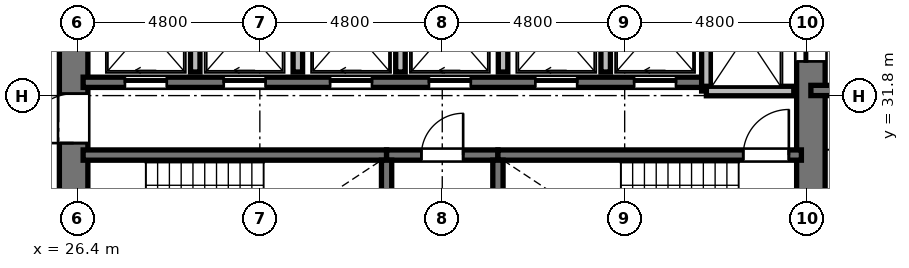
"""IFC4 building model, lengths in metres.
Left out: names, types, materials, properties, quantities, classifications, styles, units other than length and angle.
Written with IfcOpenShell. Run it as: python <this file> out.ifc"""

import sys

from ifc_helpers import new_model, si_unit, direction, frame, frame_2d, origin, place, context, subcontext, project, spatial, rectangle, extrude, element, fill, save


model = new_model("IFC4")
c1 = context("Model", 3, precision=1e-05, world=origin(), true_north=direction((0.0, 1.0)))
c2 = subcontext(c1, "Body", "Model", "MODEL_VIEW")
j1 = project(units=[si_unit("LENGTHUNIT", "METRE"), si_unit("PLANEANGLEUNIT", "RADIAN")], contexts=[c1])
p1 = place(None, origin())
s1 = spatial("IfcSite", under=j1, at=p1, CompositionType="ELEMENT")
p2 = place(p1, origin())
s2 = spatial("IfcBuilding", under=s1, at=p2, CompositionType="ELEMENT")
p3 = place(p2, frame((0.0, 0.0, 85.392)))
s3 = spatial("IfcBuildingStorey", under=s2, at=p3, CompositionType="ELEMENT", Elevation=85.392)
p4 = place(p3, frame((26.3, 20.95, 0.0), z_axis=(0.0, 0.0, 1.0), x_axis=(0.0, 1.0, 0.0)))
e1 = element("IfcWall", 1, at=p4, inside=s3, PredefinedType="SHEAR", context=c2, shape_type="SweptSolid", body=[
    extrude(rectangle(XDim=14.1, YDim=0.75, at=frame_2d((7.05, 0.0))), origin(), (0.0, 0.0, 1.0), 3.648),
])
p5 = place(p4, frame((6.5, 0.0, 0.0)))
e2 = element("IfcOpeningElement", 2, at=p5, cuts=e1, PredefinedType="OPENING", context=c2, shape_type="SweptSolid", body=[
    extrude(rectangle(XDim=1.2, YDim=2.15, at=frame_2d((0.6, 1.075))), frame((0.0, 0.385, 0.0), z_axis=(0.0, -1.0, 0.0), x_axis=(1.0, 0.0, 0.0)), (0.0, 0.0, 1.0), 0.77),
])
p6 = place(p4, frame((9.6, 0.0, 0.0)))
e3 = element("IfcOpeningElement", 3, at=p6, cuts=e1, PredefinedType="OPENING", context=c2, shape_type="SweptSolid", body=[
    extrude(rectangle(XDim=1.3, YDim=2.2, at=frame_2d((0.65, 1.1))), frame((0.0, 0.385, 0.0), z_axis=(0.0, -1.0, 0.0), x_axis=(1.0, 0.0, 0.0)), (0.0, 0.0, 1.0), 0.77),
])
p7 = place(p4, frame((3.26, 0.0, 0.0)))
e4 = element("IfcOpeningElement", 4, at=p7, cuts=e1, PredefinedType="OPENING", context=c2, shape_type="SweptSolid", body=[
    extrude(rectangle(XDim=1.3, YDim=2.2, at=frame_2d((0.65, 1.1))), frame((0.0, 0.385, 0.0), z_axis=(0.0, -1.0, 0.0), x_axis=(1.0, 0.0, 0.0)), (0.0, 0.0, 1.0), 0.77),
])
p8 = place(p3, frame((45.7, 20.95, 0.0), z_axis=(0.0, 0.0, 1.0), x_axis=(0.0, 1.0, 0.0)))
e5 = element("IfcWall", 5, at=p8, inside=s3, PredefinedType="SHEAR", context=c2, shape_type="SweptSolid", body=[
    extrude(rectangle(XDim=14.1, YDim=0.75, at=frame_2d((7.05, 0.0))), origin(), (0.0, 0.0, 1.0), 3.648),
])
p9 = place(p8, frame((11.75, 0.0, 0.0)))
e6 = element("IfcOpeningElement", 6, at=p9, cuts=e5, PredefinedType="OPENING", context=c2, shape_type="SweptSolid", body=[
    extrude(rectangle(XDim=1.4, YDim=2.3, at=frame_2d((0.7, 1.15))), frame((0.0, 0.385, 0.0), z_axis=(0.0, -1.0, 0.0), x_axis=(1.0, 0.0, 0.0)), (0.0, 0.0, 1.0), 0.77),
])
p10 = place(p8, frame((0.95, 0.0, 0.0)))
e7 = element("IfcOpeningElement", 7, at=p10, cuts=e5, PredefinedType="OPENING", context=c2, shape_type="SweptSolid", body=[
    extrude(rectangle(XDim=1.4, YDim=2.3, at=frame_2d((0.7, 1.15))), frame((0.0, 0.385, 0.0), z_axis=(0.0, -1.0, 0.0), x_axis=(1.0, 0.0, 0.0)), (0.0, 0.0, 1.0), 0.77),
])
p11 = place(p3, frame((26.55, 30.235, 0.0), z_axis=(0.0, 0.0, 1.0), x_axis=(1.0, 0.0, 0.0)))
e8 = element("IfcWall", 8, at=p11, inside=s3, PredefinedType="SHEAR", context=c2, shape_type="SweptSolid", body=[
    extrude(rectangle(XDim=7.985, YDim=0.27, at=frame_2d((3.992, 0.0))), origin(), (0.0, 0.0, 1.0), 3.648),
])
p12 = place(p3, frame((34.535, 30.235, 0.0), z_axis=(0.0, 0.0, 1.0), x_axis=(1.0, 0.0, 0.0)))
e9 = element("IfcWall", 9, at=p12, inside=s3, PredefinedType="SHEAR", context=c2, shape_type="SweptSolid", body=[
    extrude(rectangle(XDim=2.93, YDim=0.27, at=frame_2d((1.465, 0.0))), origin(), (0.0, 0.0, 1.0), 3.648),
])
p13 = place(p12, frame((0.915, 0.0, 0.0)))
e10 = element("IfcOpeningElement", 10, at=p13, cuts=e9, PredefinedType="OPENING", context=c2, shape_type="SweptSolid", body=[
    extrude(rectangle(XDim=1.1, YDim=2.15, at=frame_2d((0.55, 1.075))), frame((0.0, 0.145, 0.0), z_axis=(0.0, -1.0, 0.0), x_axis=(1.0, 0.0, 0.0)), (0.0, 0.0, 1.0), 0.29),
])
p14 = place(p3, frame((37.465, 30.235, 0.0), z_axis=(0.0, 0.0, 1.0), x_axis=(1.0, 0.0, 0.0)))
e11 = element("IfcWall", 11, at=p14, inside=s3, PredefinedType="SHEAR", context=c2, shape_type="SweptSolid", body=[
    extrude(rectangle(XDim=7.985, YDim=0.27, at=frame_2d((3.992, 0.0))), origin(), (0.0, 0.0, 1.0), 3.648),
])
p15 = place(p14, frame((6.455, 0.0, 0.0)))
e12 = element("IfcOpeningElement", 12, at=p15, cuts=e11, PredefinedType="OPENING", context=c2, shape_type="SweptSolid", body=[
    extrude(rectangle(XDim=1.2, YDim=2.15, at=frame_2d((0.6, 1.075))), frame((0.0, 0.145, 0.0), z_axis=(0.0, -1.0, 0.0), x_axis=(1.0, 0.0, 0.0)), (0.0, 0.0, 1.0), 0.29),
])
for number, where, z_axis, x_axis in (
    (13, (34.535, 26.02, 0.0), (0.0, 0.0, 1.0), (0.0, 1.0, 0.0)),
    (14, (37.465, 26.02, 0.0), (0.0, 0.0, 1.0), (0.0, 1.0, 0.0)),
):
    element("IfcWall", number, at=place(p3, frame(where, z_axis=z_axis, x_axis=x_axis)), inside=s3, PredefinedType="SHEAR", context=c2, shape_type="SweptSolid", body=[
        extrude(rectangle(XDim=4.08, YDim=0.27, at=frame_2d((2.04, 0.0))), origin(), (0.0, 0.0, 1.0), 3.648),
    ])
p16 = place(p3, frame((26.55, 32.15, 0.0), z_axis=(0.0, 0.0, 1.0), x_axis=(1.0, 0.0, 0.0)))
e15 = element("IfcWall", 15, at=p16, inside=s3, PredefinedType="SHEAR", context=c2, shape_type="SweptSolid", body=[
    extrude(rectangle(XDim=16.4, YDim=0.27, at=frame_2d((8.2, 0.0))), origin(), (0.0, 0.0, 1.0), 3.648),
])
p17 = place(p16, frame((1.1, 0.0, 0.0)))
e16 = element("IfcOpeningElement", 16, at=p17, cuts=e15, PredefinedType="OPENING", context=c2, shape_type="SweptSolid", body=[
    extrude(rectangle(XDim=1.1, YDim=2.2, at=frame_2d((0.55, 1.1))), frame((0.0, 0.145, 0.0), z_axis=(0.0, -1.0, 0.0), x_axis=(1.0, 0.0, 0.0)), (0.0, 0.0, 1.0), 0.29),
])
p18 = place(p16, frame((3.7, 0.0, 0.0)))
e17 = element("IfcOpeningElement", 17, at=p18, cuts=e15, PredefinedType="OPENING", context=c2, shape_type="SweptSolid", body=[
    extrude(rectangle(XDim=1.1, YDim=2.2, at=frame_2d((0.55, 1.1))), frame((0.0, 0.145, 0.0), z_axis=(0.0, -1.0, 0.0), x_axis=(1.0, 0.0, 0.0)), (0.0, 0.0, 1.0), 0.29),
])
p19 = place(p16, frame((6.5, 0.0, 0.0)))
e18 = element("IfcOpeningElement", 18, at=p19, cuts=e15, PredefinedType="OPENING", context=c2, shape_type="SweptSolid", body=[
    extrude(rectangle(XDim=1.1, YDim=2.2, at=frame_2d((0.55, 1.1))), frame((0.0, 0.145, 0.0), z_axis=(0.0, -1.0, 0.0), x_axis=(1.0, 0.0, 0.0)), (0.0, 0.0, 1.0), 0.29),
])
p20 = place(p16, frame((9.1, 0.0, 0.0)))
e19 = element("IfcOpeningElement", 19, at=p20, cuts=e15, PredefinedType="OPENING", context=c2, shape_type="SweptSolid", body=[
    extrude(rectangle(XDim=1.1, YDim=2.2, at=frame_2d((0.55, 1.1))), frame((0.0, 0.145, 0.0), z_axis=(0.0, -1.0, 0.0), x_axis=(1.0, 0.0, 0.0)), (0.0, 0.0, 1.0), 0.29),
])
p21 = place(p16, frame((11.9, 0.0, 0.0)))
e20 = element("IfcOpeningElement", 20, at=p21, cuts=e15, PredefinedType="OPENING", context=c2, shape_type="SweptSolid", body=[
    extrude(rectangle(XDim=1.1, YDim=2.2, at=frame_2d((0.55, 1.1))), frame((0.0, 0.145, 0.0), z_axis=(0.0, -1.0, 0.0), x_axis=(1.0, 0.0, 0.0)), (0.0, 0.0, 1.0), 0.29),
])
p22 = place(p16, frame((14.5, 0.0, 0.0)))
e21 = element("IfcOpeningElement", 21, at=p22, cuts=e15, PredefinedType="OPENING", context=c2, shape_type="SweptSolid", body=[
    extrude(rectangle(XDim=1.1, YDim=2.2, at=frame_2d((0.55, 1.1))), frame((0.0, 0.145, 0.0), z_axis=(0.0, -1.0, 0.0), x_axis=(1.0, 0.0, 0.0)), (0.0, 0.0, 1.0), 0.29),
])
p23 = place(p3, frame((42.95, 31.92, 0.0), z_axis=(0.0, 0.0, 1.0), x_axis=(0.0, 1.0, 0.0)))
e22 = element("IfcWall", 22, at=p23, inside=s3, PredefinedType="SOLIDWALL", context=c2, shape_type="SweptSolid", body=[
    extrude(rectangle(XDim=3.18, YDim=0.25, at=frame_2d((1.59, 0.0))), origin(), (0.0, 0.0, 1.0), 3.428),
])
p24 = place(p3, frame((42.95, 31.92, 0.0), z_axis=(0.0, 0.0, 1.0), x_axis=(1.0, 0.0, 0.0)))
e23 = element("IfcWall", 23, at=p24, inside=s3, PredefinedType="SOLIDWALL", context=c2, shape_type="SweptSolid", body=[
    extrude(rectangle(XDim=2.3, YDim=0.25, at=frame_2d((1.15, 0.0))), origin(), (0.0, 0.0, 1.0), 3.428),
])
for number, where, z_axis, x_axis in (
    (24, (29.5, 32.42, 0.0), (0.0, 0.0, 1.0), (0.0, 1.0, 0.0)),
    (25, (32.2, 32.42, 0.0), (0.0, 0.0, 1.0), (0.0, 1.0, 0.0)),
    (26, (34.9, 32.42, 0.0), (0.0, 0.0, 1.0), (0.0, 1.0, 0.0)),
    (27, (37.6, 32.42, 0.0), (0.0, 0.0, 1.0), (0.0, 1.0, 0.0)),
    (28, (40.3, 32.42, 0.0), (0.0, 0.0, 1.0), (0.0, 1.0, 0.0)),
):
    element("IfcWall", number, at=place(p3, frame(where, z_axis=z_axis, x_axis=x_axis)), inside=s3, PredefinedType="SOLIDWALL", context=c2, shape_type="SweptSolid", body=[
        extrude(rectangle(XDim=2.68, YDim=0.25, at=frame_2d((1.34, 0.0))), origin(), (0.0, 0.0, 1.0), 3.428),
    ])
p25 = place(p3, frame((45.7, 31.935, 0.0), z_axis=(0.0, 0.0, 1.0), x_axis=(1.0, 0.0, 0.0)))
e29 = element("IfcWall", 29, at=p25, inside=s3, PredefinedType="SHEAR", context=c2, shape_type="SweptSolid", body=[
    extrude(rectangle(XDim=4.715, YDim=0.27, at=frame_2d((2.357, 0.0))), origin(), (0.0, 0.0, 1.0), 3.648),
])
p26 = place(p15, origin())
e30 = element("IfcDoor", 30, at=p26, inside=s3, OperationType="SINGLE_SWING_RIGHT", PredefinedType="DOOR", context=c2, shape_type="SweptSolid", body=[
    extrude(rectangle(XDim=1.2, YDim=2.15, at=frame_2d((0.6, 1.075))), frame((0.0, 0.025, 0.0), z_axis=(0.0, -1.0, 0.0), x_axis=(1.0, 0.0, 0.0)), (0.0, 0.0, 1.0), 0.05),
])
fill(e12, e30)
p27 = place(p13, origin())
e31 = element("IfcDoor", 31, at=p27, inside=s3, OperationType="SINGLE_SWING_RIGHT", PredefinedType="DOOR", context=c2, shape_type="SweptSolid", body=[
    extrude(rectangle(XDim=1.1, YDim=2.15, at=frame_2d((0.55, 1.075))), frame((0.0, 0.025, 0.0), z_axis=(0.0, -1.0, 0.0), x_axis=(1.0, 0.0, 0.0)), (0.0, 0.0, 1.0), 0.05),
])
fill(e10, e31)
p28 = place(p6, origin())
e32 = element("IfcDoor", 32, at=p28, inside=s3, OperationType="SINGLE_SWING_LEFT", PredefinedType="DOOR", context=c2, shape_type="SweptSolid", body=[
    extrude(rectangle(XDim=1.3, YDim=2.2, at=frame_2d((0.65, 1.1))), frame((0.0, 0.025, 0.0), z_axis=(0.0, -1.0, 0.0), x_axis=(1.0, 0.0, 0.0)), (0.0, 0.0, 1.0), 0.05),
])
fill(e3, e32)
p29 = place(p17, origin())
e33 = element("IfcDoor", 33, at=p29, inside=s3, OperationType="SLIDING_TO_LEFT", PredefinedType="DOOR", context=c2, shape_type="SweptSolid", body=[
    extrude(rectangle(XDim=1.1, YDim=2.2, at=frame_2d((0.55, 1.1))), frame((0.0, 0.025, 0.0), z_axis=(0.0, -1.0, 0.0), x_axis=(1.0, 0.0, 0.0)), (0.0, 0.0, 1.0), 0.05),
])
fill(e16, e33)
p30 = place(p18, origin())
e34 = element("IfcDoor", 34, at=p30, inside=s3, OperationType="SLIDING_TO_LEFT", PredefinedType="DOOR", context=c2, shape_type="SweptSolid", body=[
    extrude(rectangle(XDim=1.1, YDim=2.2, at=frame_2d((0.55, 1.1))), frame((0.0, 0.025, 0.0), z_axis=(0.0, -1.0, 0.0), x_axis=(1.0, 0.0, 0.0)), (0.0, 0.0, 1.0), 0.05),
])
fill(e17, e34)
p31 = place(p19, origin())
e35 = element("IfcDoor", 35, at=p31, inside=s3, OperationType="SLIDING_TO_LEFT", PredefinedType="DOOR", context=c2, shape_type="SweptSolid", body=[
    extrude(rectangle(XDim=1.1, YDim=2.2, at=frame_2d((0.55, 1.1))), frame((0.0, 0.025, 0.0), z_axis=(0.0, -1.0, 0.0), x_axis=(1.0, 0.0, 0.0)), (0.0, 0.0, 1.0), 0.05),
])
fill(e18, e35)
p32 = place(p20, origin())
e36 = element("IfcDoor", 36, at=p32, inside=s3, OperationType="SLIDING_TO_LEFT", PredefinedType="DOOR", context=c2, shape_type="SweptSolid", body=[
    extrude(rectangle(XDim=1.1, YDim=2.2, at=frame_2d((0.55, 1.1))), frame((0.0, 0.025, 0.0), z_axis=(0.0, -1.0, 0.0), x_axis=(1.0, 0.0, 0.0)), (0.0, 0.0, 1.0), 0.05),
])
fill(e19, e36)
p33 = place(p21, origin())
e37 = element("IfcDoor", 37, at=p33, inside=s3, OperationType="SLIDING_TO_LEFT", PredefinedType="DOOR", context=c2, shape_type="SweptSolid", body=[
    extrude(rectangle(XDim=1.1, YDim=2.2, at=frame_2d((0.55, 1.1))), frame((0.0, 0.025, 0.0), z_axis=(0.0, -1.0, 0.0), x_axis=(1.0, 0.0, 0.0)), (0.0, 0.0, 1.0), 0.05),
])
fill(e20, e37)
p34 = place(p22, origin())
e38 = element("IfcDoor", 38, at=p34, inside=s3, OperationType="SLIDING_TO_LEFT", PredefinedType="DOOR", context=c2, shape_type="SweptSolid", body=[
    extrude(rectangle(XDim=1.1, YDim=2.2, at=frame_2d((0.55, 1.1))), frame((0.0, 0.025, 0.0), z_axis=(0.0, -1.0, 0.0), x_axis=(1.0, 0.0, 0.0)), (0.0, 0.0, 1.0), 0.05),
])
fill(e21, e38)
p35 = place(p9, origin())
e39 = element("IfcDoor", 39, at=p35, inside=s3, OperationType="SLIDING_TO_LEFT", PredefinedType="DOOR", context=c2, shape_type="SweptSolid", body=[
    extrude(rectangle(XDim=1.4, YDim=2.3, at=frame_2d((0.7, 1.15))), frame((0.0, 0.025, 0.0), z_axis=(0.0, -1.0, 0.0), x_axis=(1.0, 0.0, 0.0)), (0.0, 0.0, 1.0), 0.05),
])
fill(e6, e39)
save(model, sys.argv[1])
